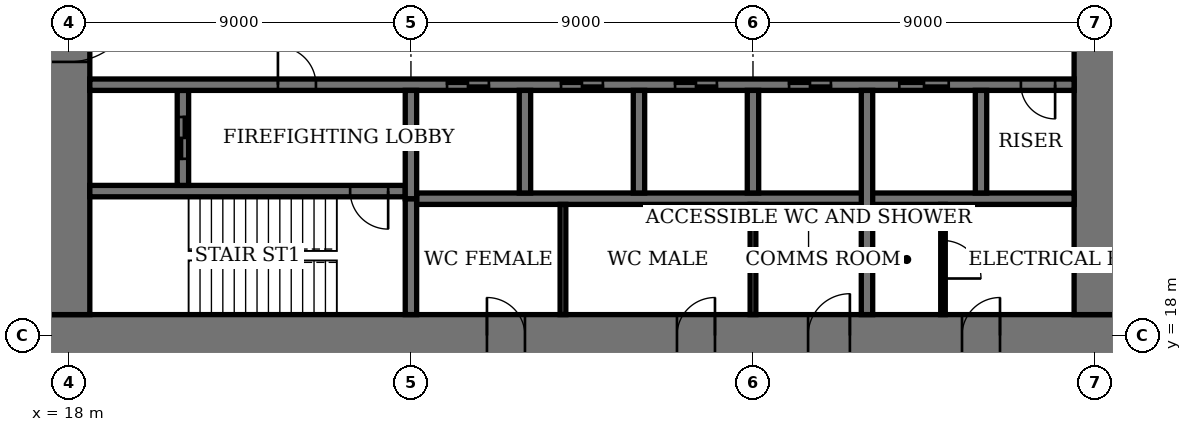
"""IFC4 building model, lengths in metres.
Left out: names, types, materials, properties, quantities, classifications, styles, units other than length and angle.
Written with IfcOpenShell. Run it as: python <this file> out.ifc"""

import sys

from ifc_helpers import new_model, si_unit, direction, frame, frame_2d, origin, place, context, subcontext, project, spatial, rectangle, extrude, element, fill, save


model = new_model("IFC4")
c1 = context("Model", 3, precision=1e-05, world=origin(), true_north=direction((0.0, 1.0)))
c2 = subcontext(c1, "Body", "Model", "MODEL_VIEW")
j1 = project(units=[si_unit("LENGTHUNIT", "METRE"), si_unit("PLANEANGLEUNIT", "RADIAN")], contexts=[c1])
p1 = place(None, origin())
s1 = spatial("IfcSite", under=j1, at=p1, CompositionType="ELEMENT")
p2 = place(p1, origin())
s2 = spatial("IfcBuilding", under=s1, at=p2, CompositionType="ELEMENT")
p3 = place(p2, frame((0.0, 0.0, 23.8)))
s3 = spatial("IfcBuildingStorey", under=s2, at=p3, CompositionType="ELEMENT", Elevation=23.8)
p4 = place(p3, frame((17.45, 18.0, 0.0), z_axis=(0.0, 0.0, 1.0), x_axis=(1.0, 0.0, 0.0)))
e1 = element("IfcWall", 1, at=p4, inside=s3, PredefinedType="SHEAR", context=c2, shape_type="SweptSolid", body=[
    extrude(rectangle(XDim=28.1, YDim=1.1, at=frame_2d((14.05, 0.0))), origin(), (0.0, 0.0, 1.0), 4.0),
])
p5 = place(p4, frame((11.55, 0.0, 0.0)))
e2 = element("IfcOpeningElement", 2, at=p5, cuts=e1, PredefinedType="OPENING", context=c2, shape_type="SweptSolid", body=[
    extrude(rectangle(XDim=1.0, YDim=2.4, at=frame_2d((0.5, 1.2))), frame((0.0, 0.56, 0.0), z_axis=(0.0, -1.0, 0.0), x_axis=(1.0, 0.0, 0.0)), (0.0, 0.0, 1.0), 1.12),
])
p6 = place(p4, frame((16.55, 0.0, 0.0)))
e3 = element("IfcOpeningElement", 3, at=p6, cuts=e1, PredefinedType="OPENING", context=c2, shape_type="SweptSolid", body=[
    extrude(rectangle(XDim=1.0, YDim=2.4, at=frame_2d((0.5, 1.2))), frame((0.0, 0.56, 0.0), z_axis=(0.0, -1.0, 0.0), x_axis=(1.0, 0.0, 0.0)), (0.0, 0.0, 1.0), 1.12),
])
p7 = place(p4, frame((20.0, 0.0, 0.0)))
e4 = element("IfcOpeningElement", 4, at=p7, cuts=e1, PredefinedType="OPENING", context=c2, shape_type="SweptSolid", body=[
    extrude(rectangle(XDim=1.1, YDim=2.4, at=frame_2d((0.55, 1.2))), frame((0.0, 0.56, 0.0), z_axis=(0.0, -1.0, 0.0), x_axis=(1.0, 0.0, 0.0)), (0.0, 0.0, 1.0), 1.12),
])
p8 = place(p4, frame((24.05, 0.0, 0.0)))
e5 = element("IfcOpeningElement", 5, at=p8, cuts=e1, PredefinedType="OPENING", context=c2, shape_type="SweptSolid", body=[
    extrude(rectangle(XDim=1.0, YDim=2.4, at=frame_2d((0.5, 1.2))), frame((0.0, 0.56, 0.0), z_axis=(0.0, -1.0, 0.0), x_axis=(1.0, 0.0, 0.0)), (0.0, 0.0, 1.0), 1.12),
])
p9 = place(p3, frame((18.0, 35.45, 0.0), z_axis=(0.0, 0.0, 1.0), x_axis=(0.0, -1.0, 0.0)))
e6 = element("IfcWall", 6, at=p9, inside=s3, PredefinedType="SHEAR", context=c2, shape_type="SweptSolid", body=[
    extrude(rectangle(XDim=16.9, YDim=1.1, at=frame_2d((8.45, 0.0))), origin(), (0.0, 0.0, 1.0), 4.0),
])
p10 = place(p9, frame((8.45, 0.0, 0.0)))
e7 = element("IfcOpeningElement", 7, at=p10, cuts=e6, PredefinedType="OPENING", context=c2, shape_type="SweptSolid", body=[
    extrude(rectangle(XDim=1.8, YDim=2.4, at=frame_2d((0.9, 1.2))), frame((0.0, 0.56, 0.0), z_axis=(0.0, -1.0, 0.0), x_axis=(1.0, 0.0, 0.0)), (0.0, 0.0, 1.0), 1.12),
])
p11 = place(p3, frame((45.0, 18.55, 0.0), z_axis=(0.0, 0.0, 1.0), x_axis=(0.0, 1.0, 0.0)))
e8 = element("IfcWall", 8, at=p11, inside=s3, PredefinedType="SHEAR", context=c2, shape_type="SweptSolid", body=[
    extrude(rectangle(XDim=16.9, YDim=1.1, at=frame_2d((8.45, 0.0))), origin(), (0.0, 0.0, 1.0), 4.0),
])
p12 = place(p11, frame((8.45, 0.0, 0.0)))
e9 = element("IfcOpeningElement", 9, at=p12, cuts=e8, PredefinedType="OPENING", context=c2, shape_type="SweptSolid", body=[
    extrude(rectangle(XDim=1.8, YDim=2.4, at=frame_2d((0.9, 1.2))), frame((0.0, 0.56, 0.0), z_axis=(0.0, -1.0, 0.0), x_axis=(1.0, 0.0, 0.0)), (0.0, 0.0, 1.0), 1.12),
])
p13 = place(p3, frame((18.55, 21.8, 0.0), z_axis=(0.0, 0.0, 1.0), x_axis=(1.0, 0.0, 0.0)))
e10 = element("IfcWall", 10, at=p13, inside=s3, PredefinedType="SHEAR", context=c2, shape_type="SweptSolid", body=[
    extrude(rectangle(XDim=8.3, YDim=0.3, at=frame_2d((4.15, 0.0))), origin(), (0.0, 0.0, 1.0), 4.0),
])
p14 = place(p13, frame((6.85, 0.0, 0.0)))
e11 = element("IfcOpeningElement", 11, at=p14, cuts=e10, PredefinedType="OPENING", context=c2, shape_type="SweptSolid", body=[
    extrude(rectangle(XDim=1.0, YDim=2.4, at=frame_2d((0.5, 1.2))), frame((0.0, 0.16, 0.0), z_axis=(0.0, -1.0, 0.0), x_axis=(1.0, 0.0, 0.0)), (0.0, 0.0, 1.0), 0.32),
])
p15 = place(p3, frame((27.0, 18.55, 0.0), z_axis=(0.0, 0.0, 1.0), x_axis=(0.0, 1.0, 0.0)))
e12 = element("IfcWall", 12, at=p15, inside=s3, PredefinedType="SHEAR", context=c2, shape_type="SweptSolid", body=[
    extrude(rectangle(XDim=3.05, YDim=0.3, at=frame_2d((1.525, 0.0))), origin(), (0.0, 0.0, 1.0), 4.0),
])
p16 = place(p3, frame((21.0, 21.95, 0.0), z_axis=(0.0, 0.0, 1.0), x_axis=(0.0, 1.0, 0.0)))
e13 = element("IfcWall", 13, at=p16, inside=s3, PredefinedType="SHEAR", context=c2, shape_type="SweptSolid", body=[
    extrude(rectangle(XDim=2.5, YDim=0.3, at=frame_2d((1.25, 0.0))), origin(), (0.0, 0.0, 1.0), 4.0),
])
p17 = place(p16, frame((0.7, 0.0, 0.0)))
e14 = element("IfcOpeningElement", 14, at=p17, cuts=e13, PredefinedType="OPENING", context=c2, shape_type="SweptSolid", body=[
    extrude(rectangle(XDim=1.1, YDim=2.4, at=frame_2d((0.55, 1.2))), frame((0.0, 0.16, 0.0), z_axis=(0.0, -1.0, 0.0), x_axis=(1.0, 0.0, 0.0)), (0.0, 0.0, 1.0), 0.32),
])
p18 = place(p3, frame((18.55, 24.6, 0.0), z_axis=(0.0, 0.0, 1.0), x_axis=(1.0, 0.0, 0.0)))
e15 = element("IfcWall", 15, at=p18, inside=s3, PredefinedType="SHEAR", context=c2, shape_type="SweptSolid", body=[
    extrude(rectangle(XDim=25.9, YDim=0.3, at=frame_2d((12.95, 0.0))), origin(), (0.0, 0.0, 1.0), 4.0),
])
p19 = place(p18, frame((4.95, 0.0, 0.0)))
e16 = element("IfcOpeningElement", 16, at=p19, cuts=e15, PredefinedType="OPENING", context=c2, shape_type="SweptSolid", body=[
    extrude(rectangle(XDim=1.0, YDim=2.4, at=frame_2d((0.5, 1.2))), frame((0.0, 0.16, 0.0), z_axis=(0.0, -1.0, 0.0), x_axis=(1.0, 0.0, 0.0)), (0.0, 0.0, 1.0), 0.32),
])
p20 = place(p18, frame((24.5, 0.0, 0.0)))
e17 = element("IfcOpeningElement", 17, at=p20, cuts=e15, PredefinedType="OPENING", context=c2, shape_type="SweptSolid", body=[
    extrude(rectangle(XDim=0.9, YDim=2.1, at=frame_2d((0.45, 1.05))), frame((0.0, 0.16, 0.0), z_axis=(0.0, -1.0, 0.0), x_axis=(1.0, 0.0, 0.0)), (0.0, 0.0, 1.0), 0.32),
])
p21 = place(p18, frame((9.4, 0.0, 0.0)))
e18 = element("IfcOpeningElement", 18, at=p21, cuts=e15, PredefinedType="OPENING", context=c2, shape_type="SweptSolid", body=[
    extrude(rectangle(XDim=1.1, YDim=2.4, at=frame_2d((0.55, 1.2))), frame((0.0, 0.16, 0.0), z_axis=(0.0, -1.0, 0.0), x_axis=(1.0, 0.0, 0.0)), (0.0, 0.0, 1.0), 0.32),
])
p22 = place(p18, frame((12.4, 0.0, 0.0)))
e19 = element("IfcOpeningElement", 19, at=p22, cuts=e15, PredefinedType="OPENING", context=c2, shape_type="SweptSolid", body=[
    extrude(rectangle(XDim=1.1, YDim=2.4, at=frame_2d((0.55, 1.2))), frame((0.0, 0.16, 0.0), z_axis=(0.0, -1.0, 0.0), x_axis=(1.0, 0.0, 0.0)), (0.0, 0.0, 1.0), 0.32),
])
p23 = place(p18, frame((15.4, 0.0, 0.0)))
e20 = element("IfcOpeningElement", 20, at=p23, cuts=e15, PredefinedType="OPENING", context=c2, shape_type="SweptSolid", body=[
    extrude(rectangle(XDim=1.1, YDim=2.4, at=frame_2d((0.55, 1.2))), frame((0.0, 0.16, 0.0), z_axis=(0.0, -1.0, 0.0), x_axis=(1.0, 0.0, 0.0)), (0.0, 0.0, 1.0), 0.32),
])
p24 = place(p18, frame((18.4, 0.0, 0.0)))
e21 = element("IfcOpeningElement", 21, at=p24, cuts=e15, PredefinedType="OPENING", context=c2, shape_type="SweptSolid", body=[
    extrude(rectangle(XDim=1.1, YDim=2.4, at=frame_2d((0.55, 1.2))), frame((0.0, 0.16, 0.0), z_axis=(0.0, -1.0, 0.0), x_axis=(1.0, 0.0, 0.0)), (0.0, 0.0, 1.0), 0.32),
])
p25 = place(p18, frame((21.3, 0.0, 0.0)))
e22 = element("IfcOpeningElement", 22, at=p25, cuts=e15, PredefinedType="OPENING", context=c2, shape_type="SweptSolid", body=[
    extrude(rectangle(XDim=1.3, YDim=2.4, at=frame_2d((0.65, 1.2))), frame((0.0, 0.16, 0.0), z_axis=(0.0, -1.0, 0.0), x_axis=(1.0, 0.0, 0.0)), (0.0, 0.0, 1.0), 0.32),
])
p26 = place(p3, frame((27.15, 21.6, 0.0), z_axis=(0.0, 0.0, 1.0), x_axis=(1.0, 0.0, 0.0)))
e23 = element("IfcWall", 23, at=p26, inside=s3, PredefinedType="SHEAR", context=c2, shape_type="SweptSolid", body=[
    extrude(rectangle(XDim=17.3, YDim=0.3, at=frame_2d((8.65, 0.0))), origin(), (0.0, 0.0, 1.0), 4.0),
])
for number, where, z_axis, x_axis in (
    (24, (30.0, 21.75, 0.0), (0.0, 0.0, 1.0), (0.0, 1.0, 0.0)),
    (25, (33.0, 21.75, 0.0), (0.0, 0.0, 1.0), (0.0, 1.0, 0.0)),
    (26, (36.0, 21.75, 0.0), (0.0, 0.0, 1.0), (0.0, 1.0, 0.0)),
):
    element("IfcWall", number, at=place(p3, frame(where, z_axis=z_axis, x_axis=x_axis)), inside=s3, PredefinedType="SHEAR", context=c2, shape_type="SweptSolid", body=[
        extrude(rectangle(XDim=2.7, YDim=0.3, at=frame_2d((1.35, 0.0))), origin(), (0.0, 0.0, 1.0), 4.0),
    ])
p27 = place(p3, frame((39.0, 18.55, 0.0), z_axis=(0.0, 0.0, 1.0), x_axis=(0.0, 1.0, 0.0)))
e27 = element("IfcWall", 27, at=p27, inside=s3, PredefinedType="SHEAR", context=c2, shape_type="SweptSolid", body=[
    extrude(rectangle(XDim=5.9, YDim=0.3, at=frame_2d((2.95, 0.0))), origin(), (0.0, 0.0, 1.0), 4.0),
])
p28 = place(p3, frame((42.0, 21.75, 0.0), z_axis=(0.0, 0.0, 1.0), x_axis=(0.0, 1.0, 0.0)))
e28 = element("IfcWall", 28, at=p28, inside=s3, PredefinedType="SHEAR", context=c2, shape_type="SweptSolid", body=[
    extrude(rectangle(XDim=2.7, YDim=0.3, at=frame_2d((1.35, 0.0))), origin(), (0.0, 0.0, 1.0), 4.0),
])
p29 = place(p3, frame((27.0, 21.6, 0.0), z_axis=(0.0, 0.0, 1.0), x_axis=(0.0, 1.0, 0.0)))
e29 = element("IfcWall", 29, at=p29, inside=s3, PredefinedType="SHEAR", context=c2, shape_type="SweptSolid", body=[
    extrude(rectangle(XDim=2.85, YDim=0.3, at=frame_2d((1.425, 0.0))), origin(), (0.0, 0.0, 1.0), 4.0),
])
for number, where, z_axis, x_axis in (
    (30, (31.0, 18.55, 0.0), (0.0, 0.0, 1.0), (0.0, 1.0, 0.0)),
    (31, (36.0, 18.55, 0.0), (0.0, 0.0, 1.0), (0.0, 1.0, 0.0)),
):
    element("IfcWall", number, at=place(p3, frame(where, z_axis=z_axis, x_axis=x_axis)), inside=s3, PredefinedType="PARTITIONING", context=c2, shape_type="SweptSolid", body=[
        extrude(rectangle(XDim=2.9, YDim=0.15, at=frame_2d((1.45, 0.0))), origin(), (0.0, 0.0, 1.0), 3.75),
    ])
p30 = place(p3, frame((41.0, 18.55, 0.0), z_axis=(0.0, 0.0, 1.0), x_axis=(0.0, 1.0, 0.0)))
e32 = element("IfcWall", 32, at=p30, inside=s3, PredefinedType="PARTITIONING", context=c2, shape_type="SweptSolid", body=[
    extrude(rectangle(XDim=2.9, YDim=0.12, at=frame_2d((1.45, 0.0))), origin(), (0.0, 0.0, 1.0), 3.75),
])
p31 = place(p30, frame((0.95, 0.0, 0.0)))
e33 = element("IfcOpeningElement", 33, at=p31, cuts=e32, PredefinedType="OPENING", context=c2, shape_type="SweptSolid", body=[
    extrude(rectangle(XDim=1.0, YDim=2.4, at=frame_2d((0.5, 1.2))), frame((0.0, 0.07, 0.0), z_axis=(0.0, -1.0, 0.0), x_axis=(1.0, 0.0, 0.0)), (0.0, 0.0, 1.0), 0.14),
])
p32 = place(p10, origin())
e34 = element("IfcDoor", 34, at=p32, inside=s3, OperationType="DOUBLE_DOOR_DOUBLE_SWING", PredefinedType="DOOR", context=c2, shape_type="SweptSolid", body=[
    extrude(rectangle(XDim=1.8, YDim=2.4, at=frame_2d((0.9, 1.2))), frame((0.0, 0.03, 0.0), z_axis=(0.0, -1.0, 0.0), x_axis=(1.0, 0.0, 0.0)), (0.0, 0.0, 1.0), 0.06),
    extrude(rectangle(XDim=0.04, YDim=2.4, at=frame_2d((0.02, 1.2))), frame((0.0, 0.55, 0.0), z_axis=(0.0, -1.0, 0.0), x_axis=(1.0, 0.0, 0.0)), (0.0, 0.0, 1.0), 1.1),
    extrude(rectangle(XDim=0.04, YDim=2.4, at=frame_2d((1.78, 1.2))), frame((0.0, 0.55, 0.0), z_axis=(0.0, -1.0, 0.0), x_axis=(1.0, 0.0, 0.0)), (0.0, 0.0, 1.0), 1.1),
    extrude(rectangle(XDim=1.8, YDim=0.04, at=frame_2d((0.9, 2.38))), frame((0.0, 0.55, 0.0), z_axis=(0.0, -1.0, 0.0), x_axis=(1.0, 0.0, 0.0)), (0.0, 0.0, 1.0), 1.1),
])
fill(e7, e34)
p33 = place(p5, origin())
e35 = element("IfcDoor", 35, at=p33, inside=s3, OperationType="SINGLE_SWING_RIGHT", PredefinedType="DOOR", context=c2, shape_type="SweptSolid", body=[
    extrude(rectangle(XDim=1.0, YDim=2.4, at=frame_2d((0.5, 1.2))), frame((0.0, 0.025, 0.0), z_axis=(0.0, -1.0, 0.0), x_axis=(1.0, 0.0, 0.0)), (0.0, 0.0, 1.0), 0.05),
    extrude(rectangle(XDim=0.04, YDim=2.4, at=frame_2d((0.02, 1.2))), frame((0.0, 0.4, 0.0), z_axis=(0.0, -1.0, 0.0), x_axis=(1.0, 0.0, 0.0)), (0.0, 0.0, 1.0), 0.8),
    extrude(rectangle(XDim=0.04, YDim=2.4, at=frame_2d((0.98, 1.2))), frame((0.0, 0.4, 0.0), z_axis=(0.0, -1.0, 0.0), x_axis=(1.0, 0.0, 0.0)), (0.0, 0.0, 1.0), 0.8),
    extrude(rectangle(XDim=1.0, YDim=0.04, at=frame_2d((0.5, 2.38))), frame((0.0, 0.4, 0.0), z_axis=(0.0, -1.0, 0.0), x_axis=(1.0, 0.0, 0.0)), (0.0, 0.0, 1.0), 0.8),
])
fill(e2, e35)
p34 = place(p6, origin())
e36 = element("IfcDoor", 36, at=p34, inside=s3, OperationType="SINGLE_SWING_LEFT", PredefinedType="DOOR", context=c2, shape_type="SweptSolid", body=[
    extrude(rectangle(XDim=1.0, YDim=2.4, at=frame_2d((0.5, 1.2))), frame((0.0, 0.025, 0.0), z_axis=(0.0, -1.0, 0.0), x_axis=(1.0, 0.0, 0.0)), (0.0, 0.0, 1.0), 0.05),
    extrude(rectangle(XDim=0.04, YDim=2.4, at=frame_2d((0.02, 1.2))), frame((0.0, 0.4, 0.0), z_axis=(0.0, -1.0, 0.0), x_axis=(1.0, 0.0, 0.0)), (0.0, 0.0, 1.0), 0.8),
    extrude(rectangle(XDim=0.04, YDim=2.4, at=frame_2d((0.98, 1.2))), frame((0.0, 0.4, 0.0), z_axis=(0.0, -1.0, 0.0), x_axis=(1.0, 0.0, 0.0)), (0.0, 0.0, 1.0), 0.8),
    extrude(rectangle(XDim=1.0, YDim=0.04, at=frame_2d((0.5, 2.38))), frame((0.0, 0.4, 0.0), z_axis=(0.0, -1.0, 0.0), x_axis=(1.0, 0.0, 0.0)), (0.0, 0.0, 1.0), 0.8),
])
fill(e3, e36)
p35 = place(p7, origin())
e37 = element("IfcDoor", 37, at=p35, inside=s3, OperationType="SINGLE_SWING_LEFT", PredefinedType="DOOR", context=c2, shape_type="SweptSolid", body=[
    extrude(rectangle(XDim=1.1, YDim=2.4, at=frame_2d((0.55, 1.2))), frame((0.0, 0.025, 0.0), z_axis=(0.0, -1.0, 0.0), x_axis=(1.0, 0.0, 0.0)), (0.0, 0.0, 1.0), 0.05),
    extrude(rectangle(XDim=0.04, YDim=2.4, at=frame_2d((0.02, 1.2))), frame((0.0, 0.44, 0.0), z_axis=(0.0, -1.0, 0.0), x_axis=(1.0, 0.0, 0.0)), (0.0, 0.0, 1.0), 0.88),
    extrude(rectangle(XDim=0.04, YDim=2.4, at=frame_2d((1.08, 1.2))), frame((0.0, 0.44, 0.0), z_axis=(0.0, -1.0, 0.0), x_axis=(1.0, 0.0, 0.0)), (0.0, 0.0, 1.0), 0.88),
    extrude(rectangle(XDim=1.1, YDim=0.04, at=frame_2d((0.55, 2.38))), frame((0.0, 0.44, 0.0), z_axis=(0.0, -1.0, 0.0), x_axis=(1.0, 0.0, 0.0)), (0.0, 0.0, 1.0), 0.88),
])
fill(e4, e37)
p36 = place(p8, origin())
e38 = element("IfcDoor", 38, at=p36, inside=s3, OperationType="SINGLE_SWING_LEFT", PredefinedType="DOOR", context=c2, shape_type="SweptSolid", body=[
    extrude(rectangle(XDim=1.0, YDim=2.4, at=frame_2d((0.5, 1.2))), frame((0.0, 0.025, 0.0), z_axis=(0.0, -1.0, 0.0), x_axis=(1.0, 0.0, 0.0)), (0.0, 0.0, 1.0), 0.05),
    extrude(rectangle(XDim=0.04, YDim=2.4, at=frame_2d((0.02, 1.2))), frame((0.0, 0.4, 0.0), z_axis=(0.0, -1.0, 0.0), x_axis=(1.0, 0.0, 0.0)), (0.0, 0.0, 1.0), 0.8),
    extrude(rectangle(XDim=0.04, YDim=2.4, at=frame_2d((0.98, 1.2))), frame((0.0, 0.4, 0.0), z_axis=(0.0, -1.0, 0.0), x_axis=(1.0, 0.0, 0.0)), (0.0, 0.0, 1.0), 0.8),
    extrude(rectangle(XDim=1.0, YDim=0.04, at=frame_2d((0.5, 2.38))), frame((0.0, 0.4, 0.0), z_axis=(0.0, -1.0, 0.0), x_axis=(1.0, 0.0, 0.0)), (0.0, 0.0, 1.0), 0.8),
])
fill(e5, e38)
p37 = place(p14, origin())
e39 = element("IfcDoor", 39, at=p37, inside=s3, OperationType="SINGLE_SWING_RIGHT", PredefinedType="DOOR", context=c2, shape_type="SweptSolid", body=[
    extrude(rectangle(XDim=1.0, YDim=2.4, at=frame_2d((0.5, 1.2))), frame((0.0, 0.03, 0.0), z_axis=(0.0, -1.0, 0.0), x_axis=(1.0, 0.0, 0.0)), (0.0, 0.0, 1.0), 0.06),
])
fill(e11, e39)
p38 = place(p19, origin())
e40 = element("IfcDoor", 40, at=p38, inside=s3, OperationType="SINGLE_SWING_RIGHT", PredefinedType="DOOR", context=c2, shape_type="SweptSolid", body=[
    extrude(rectangle(XDim=1.0, YDim=2.4, at=frame_2d((0.5, 1.2))), frame((0.0, 0.03, 0.0), z_axis=(0.0, -1.0, 0.0), x_axis=(1.0, 0.0, 0.0)), (0.0, 0.0, 1.0), 0.06),
])
fill(e16, e40)
p39 = place(p20, origin())
e41 = element("IfcDoor", 41, at=p39, inside=s3, OperationType="SINGLE_SWING_RIGHT", PredefinedType="DOOR", context=c2, shape_type="SweptSolid", body=[
    extrude(rectangle(XDim=0.9, YDim=2.1, at=frame_2d((0.45, 1.05))), frame((0.0, 0.03, 0.0), z_axis=(0.0, -1.0, 0.0), x_axis=(1.0, 0.0, 0.0)), (0.0, 0.0, 1.0), 0.06),
])
fill(e17, e41)
p40 = place(p31, origin())
e42 = element("IfcDoor", 42, at=p40, inside=s3, OperationType="SINGLE_SWING_LEFT", PredefinedType="DOOR", context=c2, shape_type="SweptSolid", body=[
    extrude(rectangle(XDim=1.0, YDim=2.4, at=frame_2d((0.5, 1.2))), frame((0.0, 0.03, 0.0), z_axis=(0.0, -1.0, 0.0), x_axis=(1.0, 0.0, 0.0)), (0.0, 0.0, 1.0), 0.06),
])
fill(e33, e42)
p41 = place(p21, origin())
e43 = element("IfcDoor", 43, at=p41, inside=s3, OperationType="DOUBLE_DOOR_SLIDING", PredefinedType="DOOR", context=c2, shape_type="SweptSolid", body=[
    extrude(rectangle(XDim=1.1, YDim=2.4, at=frame_2d((0.55, 1.2))), frame((0.0, 0.02, 0.0), z_axis=(0.0, -1.0, 0.0), x_axis=(1.0, 0.0, 0.0)), (0.0, 0.0, 1.0), 0.04),
])
fill(e18, e43)
p42 = place(p22, origin())
e44 = element("IfcDoor", 44, at=p42, inside=s3, OperationType="DOUBLE_DOOR_SLIDING", PredefinedType="DOOR", context=c2, shape_type="SweptSolid", body=[
    extrude(rectangle(XDim=1.1, YDim=2.4, at=frame_2d((0.55, 1.2))), frame((0.0, 0.02, 0.0), z_axis=(0.0, -1.0, 0.0), x_axis=(1.0, 0.0, 0.0)), (0.0, 0.0, 1.0), 0.04),
])
fill(e19, e44)
p43 = place(p23, origin())
e45 = element("IfcDoor", 45, at=p43, inside=s3, OperationType="DOUBLE_DOOR_SLIDING", PredefinedType="DOOR", context=c2, shape_type="SweptSolid", body=[
    extrude(rectangle(XDim=1.1, YDim=2.4, at=frame_2d((0.55, 1.2))), frame((0.0, 0.02, 0.0), z_axis=(0.0, -1.0, 0.0), x_axis=(1.0, 0.0, 0.0)), (0.0, 0.0, 1.0), 0.04),
])
fill(e20, e45)
p44 = place(p24, origin())
e46 = element("IfcDoor", 46, at=p44, inside=s3, OperationType="DOUBLE_DOOR_SLIDING", PredefinedType="DOOR", context=c2, shape_type="SweptSolid", body=[
    extrude(rectangle(XDim=1.1, YDim=2.4, at=frame_2d((0.55, 1.2))), frame((0.0, 0.02, 0.0), z_axis=(0.0, -1.0, 0.0), x_axis=(1.0, 0.0, 0.0)), (0.0, 0.0, 1.0), 0.04),
])
fill(e21, e46)
p45 = place(p25, origin())
e47 = element("IfcDoor", 47, at=p45, inside=s3, OperationType="DOUBLE_DOOR_SLIDING", PredefinedType="DOOR", context=c2, shape_type="SweptSolid", body=[
    extrude(rectangle(XDim=1.3, YDim=2.4, at=frame_2d((0.65, 1.2))), frame((0.0, 0.02, 0.0), z_axis=(0.0, -1.0, 0.0), x_axis=(1.0, 0.0, 0.0)), (0.0, 0.0, 1.0), 0.04),
])
fill(e22, e47)
p46 = place(p17, origin())
e48 = element("IfcDoor", 48, at=p46, inside=s3, OperationType="DOUBLE_DOOR_SLIDING", PredefinedType="DOOR", context=c2, shape_type="SweptSolid", body=[
    extrude(rectangle(XDim=1.1, YDim=2.4, at=frame_2d((0.55, 1.2))), frame((0.0, 0.03, 0.0), z_axis=(0.0, -1.0, 0.0), x_axis=(1.0, 0.0, 0.0)), (0.0, 0.0, 1.0), 0.06),
])
fill(e14, e48)
save(model, sys.argv[1])
